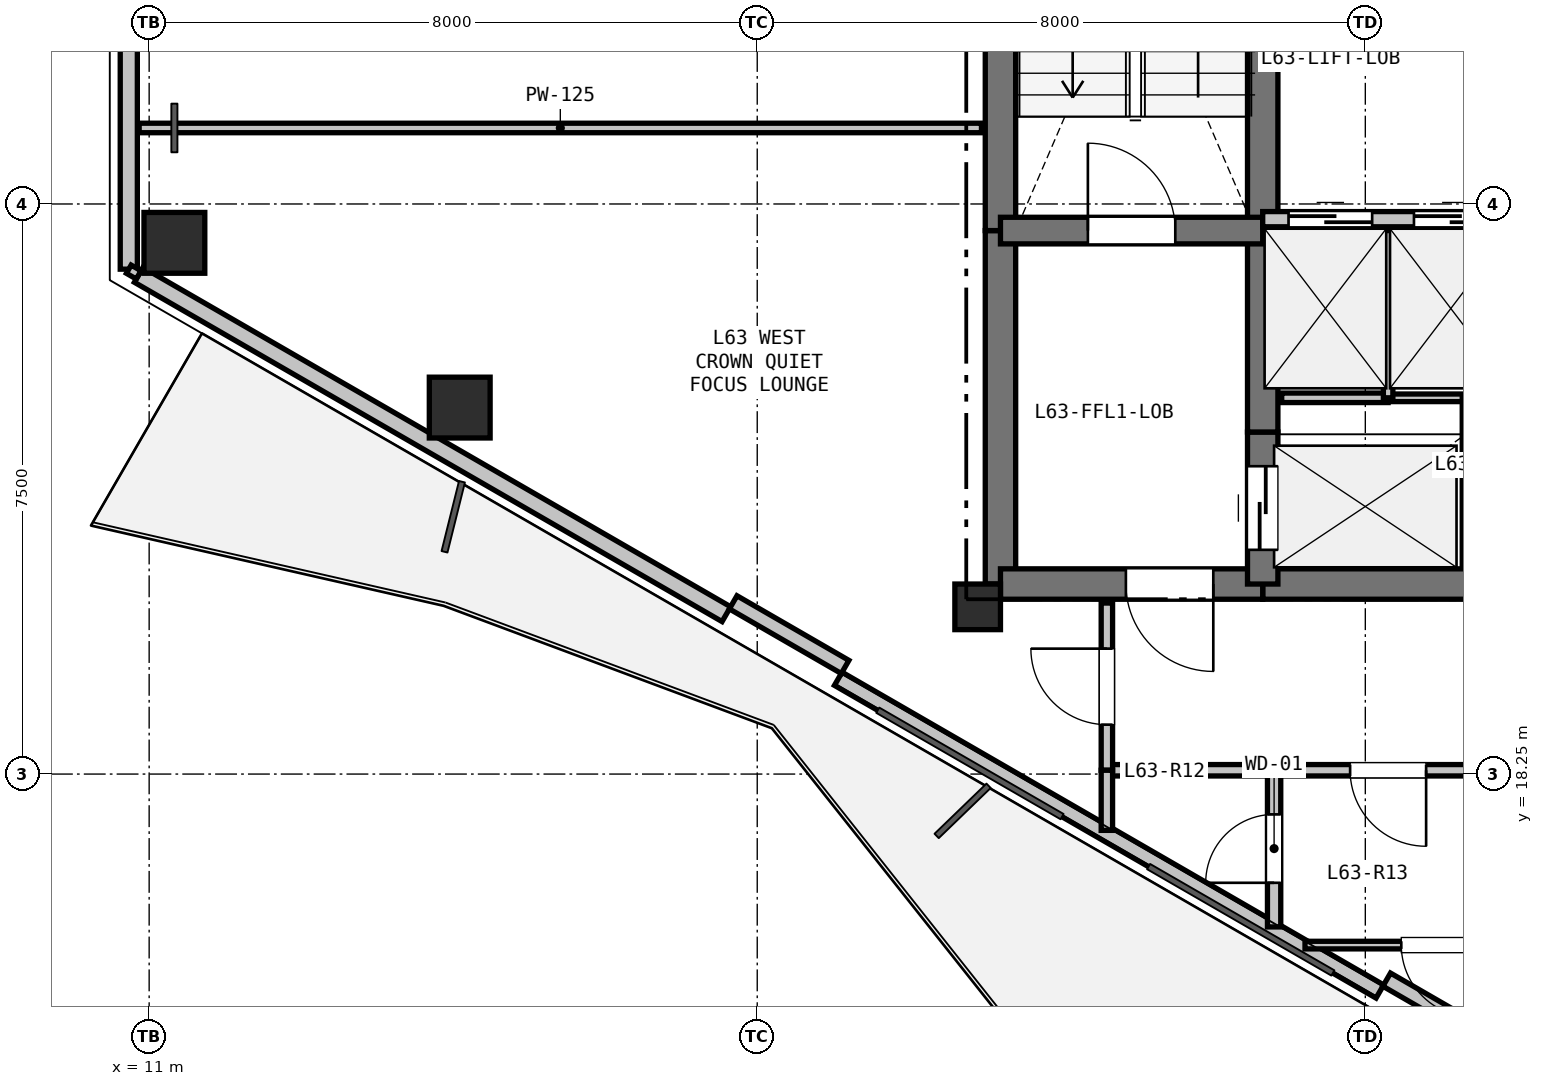
"""IFC4 building model, lengths in metres.
Left out: names, types, materials, properties, quantities, classifications, styles, units other than length and angle.
Written with IfcOpenShell. Run it as: python <this file> out.ifc"""

import sys

from ifc_helpers import new_model, si_unit, direction, frame, frame_2d, origin, origin_2d, place, context, subcontext, project, spatial, rectangle, hollow_rectangle, extrude, element, fill, save


model = new_model("IFC4")
c1 = context("Model", 3, precision=1e-05, world=origin(), true_north=direction((0.0, 1.0)))
c2 = subcontext(c1, "Body", "Model", "MODEL_VIEW")
j1 = project(units=[si_unit("LENGTHUNIT", "METRE"), si_unit("PLANEANGLEUNIT", "RADIAN")], contexts=[c1])
p1 = place(None, origin())
s1 = spatial("IfcSite", under=j1, at=p1, CompositionType="ELEMENT")
p2 = place(p1, origin())
s2 = spatial("IfcBuilding", under=s1, at=p2, CompositionType="ELEMENT")
p3 = place(p2, frame((0.0, 0.0, 226.5)))
s3 = spatial("IfcBuildingStorey", under=s2, at=p3, CompositionType="ELEMENT", Elevation=226.5)
p4 = place(p3, frame((21.9, 20.45, 0.0), z_axis=(0.0, 0.0, 1.0), x_axis=(1.0, 0.0, 0.0)))
e1 = element("IfcColumn", 1, at=p4, inside=s3, PredefinedType="COLUMN", context=c2, shape_type="SweptSolid", body=[
    extrude(rectangle(XDim=0.6, YDim=0.6, at=origin_2d()), origin(), (0.0, 0.0, 1.0), 3.3),
])
for number, where, z_axis, x_axis in (
    (2, (15.086, 23.072, 0.0), (0.0, 0.0, 1.0), (1.0, 0.0, 0.0)),
    (3, (11.332, 25.239, 0.0), (0.0, 0.0, 1.0), (1.0, 0.0, 0.0)),
):
    element("IfcColumn", number, at=place(p3, frame(where, z_axis=z_axis, x_axis=x_axis)), inside=s3, PredefinedType="COLUMN", context=c2, shape_type="SweptSolid", body=[
        extrude(hollow_rectangle(XDim=0.8, YDim=0.8, WallThickness=0.025, at=origin_2d()), origin(), (0.0, 0.0, 1.0), 3.3),
    ])
p5 = place(p3, frame((10.732, 24.892, 0.0), z_axis=(0.0, 0.0, 1.0), x_axis=(0.0, 1.0, 0.0)))
e4 = element("IfcWall", 4, at=p5, inside=s3, PredefinedType="SOLIDWALL", context=c2, shape_type="SweptSolid", body=[
    extrude(rectangle(XDim=3.715, YDim=0.225, at=frame_2d((1.858, 0.0))), origin(), (0.0, 0.0, 1.0), 2.7),
])
p6 = place(p3, frame((27.191, 15.389, 0.0), z_axis=(0.0, 0.0, 1.0), x_axis=(-0.866019557082, 0.500010126649, 0.0)))
e5 = element("IfcWall", 5, at=p6, inside=s3, PredefinedType="PARAPET", context=c2, shape_type="SweptSolid", body=[
    extrude(rectangle(XDim=8.228, YDim=0.2, at=frame_2d((4.114, 0.0))), origin(), (0.0, 0.0, 1.0), 0.2),
])
p7 = place(p3, frame((18.594, 20.354, 0.0), z_axis=(0.0, 0.0, 1.0), x_axis=(-0.866026655105, 0.499997832642, 0.0)))
e6 = element("IfcWall", 6, at=p7, inside=s3, PredefinedType="SOLIDWALL", context=c2, shape_type="SweptSolid", body=[
    extrude(rectangle(XDim=8.928, YDim=0.225, at=frame_2d((4.464, 0.0))), origin(), (0.0, 0.0, 1.0), 2.7),
])
for number, where, z_axis, x_axis in (
    (7, (28.754, 14.695, 0.0), (0.0, 0.0, 1.0), (-0.866, 0.5, 0.0)),
    (8, (20.156, 19.659, 0.0), (0.0, 0.0, 1.0), (-0.866, 0.5, 0.0)),
):
    element("IfcWall", number, at=place(p3, frame(where, z_axis=z_axis, x_axis=x_axis)), inside=s3, PredefinedType="PARAPET", context=c2, shape_type="SweptSolid", body=[
        extrude(rectangle(XDim=1.7, YDim=0.2, at=frame_2d((0.85, 0.0))), origin(), (0.0, 0.0, 1.0), 2.7),
    ])
p8 = place(p3, frame((22.2, 20.75, 0.0), z_axis=(0.0, 0.0, 1.0), x_axis=(0.0, 1.0, 0.0)))
e9 = element("IfcWall", 9, at=p8, inside=s3, PredefinedType="SHEAR", context=c2, shape_type="SweptSolid", body=[
    extrude(rectangle(XDim=4.65, YDim=0.4, at=frame_2d((2.325, 0.0))), origin(), (0.0, 0.0, 1.0), 3.08),
])
p9 = place(p3, frame((22.2, 25.4, 0.0), z_axis=(0.0, 0.0, 1.0), x_axis=(0.0, 1.0, 0.0)))
e10 = element("IfcWall", 10, at=p9, inside=s3, PredefinedType="SHEAR", context=c2, shape_type="SweptSolid", body=[
    extrude(rectangle(XDim=7.35, YDim=0.4, at=frame_2d((3.675, 0.0))), origin(), (0.0, 0.0, 1.0), 3.08),
])
p10 = place(p3, frame((28.35, 20.75, 0.0), z_axis=(0.0, 0.0, 1.0), x_axis=(-1.0, 0.0, 0.0)))
e11 = element("IfcWall", 11, at=p10, inside=s3, PredefinedType="SHEAR", context=c2, shape_type="SweptSolid", body=[
    extrude(rectangle(XDim=2.7, YDim=0.4, at=frame_2d((1.35, 0.0))), origin(), (0.0, 0.0, 1.0), 3.08),
])
p11 = place(p3, frame((25.65, 20.75, 0.0), z_axis=(0.0, 0.0, 1.0), x_axis=(-1.0, 0.0, 0.0)))
e12 = element("IfcWall", 12, at=p11, inside=s3, PredefinedType="SHEAR", context=c2, shape_type="SweptSolid", body=[
    extrude(rectangle(XDim=3.45, YDim=0.4, at=frame_2d((1.725, 0.0))), origin(), (0.0, 0.0, 1.0), 3.08),
])
p12 = place(p11, frame((0.65, 0.0, 0.0)))
e13 = element("IfcOpeningElement", 13, at=p12, cuts=e12, PredefinedType="OPENING", context=c2, shape_type="SweptSolid", body=[
    extrude(rectangle(XDim=1.15, YDim=2.15, at=frame_2d((0.575, 1.075))), frame((0.0, 0.21, 0.0), z_axis=(0.0, -1.0, 0.0), x_axis=(1.0, 0.0, 0.0)), (0.0, 0.0, 1.0), 0.42),
])
p13 = place(p3, frame((25.65, 20.75, 0.0), z_axis=(0.0, 0.0, 1.0), x_axis=(0.0, 1.0, 0.0)))
e14 = element("IfcWall", 14, at=p13, inside=s3, PredefinedType="SHEAR", context=c2, shape_type="SweptSolid", body=[
    extrude(rectangle(XDim=2.0, YDim=0.4, at=frame_2d((1.0, 0.0))), origin(), (0.0, 0.0, 1.0), 3.08),
])
p14 = place(p13, frame((0.45, 0.0, 0.0)))
e15 = element("IfcOpeningElement", 15, at=p14, cuts=e14, PredefinedType="OPENING", context=c2, shape_type="SweptSolid", body=[
    extrude(rectangle(XDim=1.1, YDim=2.15, at=frame_2d((0.55, 1.075))), frame((0.0, 0.21, 0.0), z_axis=(0.0, -1.0, 0.0), x_axis=(1.0, 0.0, 0.0)), (0.0, 0.0, 1.0), 0.42),
])
p15 = place(p3, frame((25.65, 22.75, 0.0), z_axis=(0.0, 0.0, 1.0), x_axis=(0.0, 1.0, 0.0)))
e16 = element("IfcWall", 16, at=p15, inside=s3, PredefinedType="SHEAR", context=c2, shape_type="SweptSolid", body=[
    extrude(rectangle(XDim=2.8, YDim=0.4, at=frame_2d((1.4, 0.0))), origin(), (0.0, 0.0, 1.0), 3.08),
])
p16 = place(p3, frame((25.65, 25.55, 0.0), z_axis=(0.0, 0.0, 1.0), x_axis=(0.0, 1.0, 0.0)))
e17 = element("IfcWall", 17, at=p16, inside=s3, PredefinedType="SHEAR", context=c2, shape_type="SweptSolid", body=[
    extrude(rectangle(XDim=2.4, YDim=0.4, at=frame_2d((1.2, 0.0))), origin(), (0.0, 0.0, 1.0), 3.08),
])
p17 = place(p3, frame((22.2, 25.4, 0.0), z_axis=(0.0, 0.0, 1.0), x_axis=(1.0, 0.0, 0.0)))
e18 = element("IfcWall", 18, at=p17, inside=s3, PredefinedType="SHEAR", context=c2, shape_type="SweptSolid", body=[
    extrude(rectangle(XDim=3.45, YDim=0.35, at=frame_2d((1.725, 0.0))), origin(), (0.0, 0.0, 1.0), 3.08),
])
p18 = place(p17, frame((1.15, 0.0, 0.0)))
e19 = element("IfcOpeningElement", 19, at=p18, cuts=e18, PredefinedType="OPENING", context=c2, shape_type="SweptSolid", body=[
    extrude(rectangle(XDim=1.15, YDim=2.15, at=frame_2d((0.575, 1.075))), frame((0.0, 0.185, 0.0), z_axis=(0.0, -1.0, 0.0), x_axis=(1.0, 0.0, 0.0)), (0.0, 0.0, 1.0), 0.37),
])
p19 = place(p3, frame((25.65, 25.55, 0.0), z_axis=(0.0, 0.0, 1.0), x_axis=(1.0, 0.0, 0.0)))
e20 = element("IfcWall", 20, at=p19, inside=s3, PredefinedType="PARTITIONING", context=c2, shape_type="SweptSolid", body=[
    extrude(rectangle(XDim=4.95, YDim=0.2, at=frame_2d((2.475, 0.0))), origin(), (0.0, 0.0, 1.0), 3.08),
])
p20 = place(p19, frame((0.34, 0.0, 0.0)))
e21 = element("IfcOpeningElement", 21, at=p20, cuts=e20, PredefinedType="OPENING", context=c2, shape_type="SweptSolid", body=[
    extrude(rectangle(XDim=1.1, YDim=2.15, at=frame_2d((0.55, 1.075))), frame((0.0, 0.11, 0.0), z_axis=(0.0, -1.0, 0.0), x_axis=(1.0, 0.0, 0.0)), (0.0, 0.0, 1.0), 0.22),
])
p21 = place(p19, frame((1.99, 0.0, 0.0)))
e22 = element("IfcOpeningElement", 22, at=p21, cuts=e20, PredefinedType="OPENING", context=c2, shape_type="SweptSolid", body=[
    extrude(rectangle(XDim=1.1, YDim=2.15, at=frame_2d((0.55, 1.075))), frame((0.0, 0.11, 0.0), z_axis=(0.0, -1.0, 0.0), x_axis=(1.0, 0.0, 0.0)), (0.0, 0.0, 1.0), 0.22),
])
p22 = place(p19, frame((3.64, 0.0, 0.0)))
e23 = element("IfcOpeningElement", 23, at=p22, cuts=e20, PredefinedType="OPENING", context=c2, shape_type="SweptSolid", body=[
    extrude(rectangle(XDim=1.1, YDim=2.15, at=frame_2d((0.55, 1.075))), frame((0.0, 0.11, 0.0), z_axis=(0.0, -1.0, 0.0), x_axis=(1.0, 0.0, 0.0)), (0.0, 0.0, 1.0), 0.22),
])
p23 = place(p3, frame((25.9, 23.2, 0.0), z_axis=(0.0, 0.0, 1.0), x_axis=(1.0, 0.0, 0.0)))
e24 = element("IfcWall", 24, at=p23, inside=s3, PredefinedType="PARTITIONING", context=c2, shape_type="SweptSolid", body=[
    extrude(rectangle(XDim=1.4, YDim=0.125, at=frame_2d((0.7, 0.0))), origin(), (0.0, 0.0, 1.0), 3.08),
])
p24 = place(p3, frame((27.3, 23.2, 0.0), z_axis=(0.0, 0.0, 1.0), x_axis=(1.0, 0.0, 0.0)))
e25 = element("IfcWall", 25, at=p24, inside=s3, PredefinedType="PARTITIONING", context=c2, shape_type="SweptSolid", body=[
    extrude(rectangle(XDim=1.05, YDim=0.1, at=frame_2d((0.525, 0.0))), origin(), (0.0, 0.0, 1.0), 3.08),
])
p25 = place(p3, frame((28.35, 23.2, 0.0), z_axis=(0.0, 0.0, 1.0), x_axis=(0.0, -1.0, 0.0)))
e26 = element("IfcWall", 26, at=p25, inside=s3, PredefinedType="PARTITIONING", context=c2, shape_type="SweptSolid", body=[
    extrude(rectangle(XDim=2.2, YDim=0.15, at=frame_2d((1.1, 0.0))), origin(), (0.0, 0.0, 1.0), 3.08),
])
p26 = place(p3, frame((27.3, 25.4, 0.0), z_axis=(0.0, 0.0, 1.0), x_axis=(0.0, -1.0, 0.0)))
e27 = element("IfcWall", 27, at=p26, inside=s3, PredefinedType="PARTITIONING", context=c2, shape_type="SweptSolid", body=[
    extrude(rectangle(XDim=2.2, YDim=0.125, at=frame_2d((1.1, 0.0))), origin(), (0.0, 0.0, 1.0), 3.08),
])
p27 = place(p3, frame((28.8, 18.3, 0.0), z_axis=(0.0, 0.0, 1.0), x_axis=(-1.0, 0.0, 0.0)))
e28 = element("IfcWall", 28, at=p27, inside=s3, PredefinedType="PARTITIONING", context=c2, shape_type="SweptSolid", body=[
    extrude(rectangle(XDim=3.0, YDim=0.15, at=frame_2d((1.5, 0.0))), origin(), (0.0, 0.0, 1.0), 3.08),
])
p28 = place(p27, frame((1.0, 0.0, 0.0)))
e29 = element("IfcOpeningElement", 29, at=p28, cuts=e28, PredefinedType="OPENING", context=c2, shape_type="SweptSolid", body=[
    extrude(rectangle(XDim=1.0, YDim=2.15, at=frame_2d((0.5, 1.075))), frame((0.0, 0.085, 0.0), z_axis=(0.0, -1.0, 0.0), x_axis=(1.0, 0.0, 0.0)), (0.0, 0.0, 1.0), 0.17),
])
p29 = place(p3, frame((25.8, 18.3, 0.0), z_axis=(0.0, 0.0, 1.0), x_axis=(-1.0, 0.0, 0.0)))
e30 = element("IfcWall", 30, at=p29, inside=s3, PredefinedType="PARTITIONING", context=c2, shape_type="SweptSolid", body=[
    extrude(rectangle(XDim=2.2, YDim=0.15, at=frame_2d((1.1, 0.0))), origin(), (0.0, 0.0, 1.0), 2.365),
])
p30 = place(p3, frame((23.6, 18.3, 0.0), z_axis=(0.0, 0.0, 1.0), x_axis=(0.0, 1.0, 0.0)))
e31 = element("IfcWall", 31, at=p30, inside=s3, PredefinedType="PARTITIONING", context=c2, shape_type="SweptSolid", body=[
    extrude(rectangle(XDim=2.2, YDim=0.15, at=frame_2d((1.1, 0.0))), origin(), (0.0, 0.0, 1.0), 2.528),
])
p31 = place(p30, frame((0.6, 0.0, 0.0)))
e32 = element("IfcOpeningElement", 32, at=p31, cuts=e31, PredefinedType="OPENING", context=c2, shape_type="SweptSolid", body=[
    extrude(rectangle(XDim=1.0, YDim=2.15, at=frame_2d((0.5, 1.075))), frame((0.0, 0.085, 0.0), z_axis=(0.0, -1.0, 0.0), x_axis=(1.0, 0.0, 0.0)), (0.0, 0.0, 1.0), 0.17),
])
p32 = place(p3, frame((28.8, 16.0, 0.0), z_axis=(0.0, 0.0, 1.0), x_axis=(-1.0, 0.0, 0.0)))
e33 = element("IfcWall", 33, at=p32, inside=s3, PredefinedType="PARTITIONING", context=c2, shape_type="SweptSolid", body=[
    extrude(rectangle(XDim=2.594, YDim=0.1, at=frame_2d((1.297, 0.0))), origin(), (0.0, 0.0, 1.0), 2.365),
])
p33 = place(p32, frame((0.377, 0.0, 0.0)))
e34 = element("IfcOpeningElement", 34, at=p33, cuts=e33, PredefinedType="OPENING", context=c2, shape_type="SweptSolid", body=[
    extrude(rectangle(XDim=0.95, YDim=2.1, at=frame_2d((0.475, 1.05))), frame((0.0, 0.06, 0.0), z_axis=(0.0, -1.0, 0.0), x_axis=(1.0, 0.0, 0.0)), (0.0, 0.0, 1.0), 0.12),
])
p34 = place(p3, frame((25.8, 16.239, 0.0), z_axis=(0.0, 0.0, 1.0), x_axis=(0.0, 1.0, 0.0)))
e35 = element("IfcWall", 35, at=p34, inside=s3, PredefinedType="PLUMBINGWALL", context=c2, shape_type="SweptSolid", body=[
    extrude(rectangle(XDim=2.061, YDim=0.175, at=frame_2d((1.031, 0.0))), origin(), (0.0, 0.0, 1.0), 2.365),
])
p35 = place(p34, frame((0.581, 0.0, 0.0)))
e36 = element("IfcOpeningElement", 36, at=p35, cuts=e35, PredefinedType="OPENING", context=c2, shape_type="SweptSolid", body=[
    extrude(rectangle(XDim=0.9, YDim=2.1, at=frame_2d((0.45, 1.05))), frame((0.0, 0.097, 0.0), z_axis=(0.0, -1.0, 0.0), x_axis=(1.0, 0.0, 0.0)), (0.0, 0.0, 1.0), 0.195),
])
p36 = place(p3, frame((23.6, 17.509, 0.0), z_axis=(0.0, 0.0, 1.0), x_axis=(0.0, 1.0, 0.0)))
e37 = element("IfcWall", 37, at=p36, inside=s3, PredefinedType="PARTITIONING", context=c2, shape_type="SweptSolid", body=[
    extrude(rectangle(XDim=0.791, YDim=0.15, at=frame_2d((0.396, 0.0))), origin(), (0.0, 0.0, 1.0), 2.365),
])
p37 = place(p3, frame((21.95, 26.75, 0.0), z_axis=(0.0, 0.0, 1.0), x_axis=(-1.0, 0.0, 0.0)))
e38 = element("IfcWall", 38, at=p37, inside=s3, PredefinedType="PARTITIONING", context=c2, shape_type="SweptSolid", body=[
    extrude(rectangle(XDim=11.082, YDim=0.125, at=frame_2d((5.541, 0.0))), origin(), (0.0, 0.0, 1.0), 2.605),
])
p38 = place(p3, frame((10.862, 24.817, 0.0), z_axis=(0.0, 0.0, 1.0), x_axis=(-0.866131372301, 0.499816412211, 0.0)))
e39 = element("IfcWall", 39, at=p38, inside=s3, PredefinedType="PARTITIONING", context=c2, shape_type="SweptSolid", body=[
    extrude(rectangle(XDim=0.15, YDim=0.125, at=frame_2d((0.075, 0.0))), origin(), (0.0, 0.0, 1.0), 3.08),
])
p39 = place(p20, origin())
e40 = element("IfcDoor", 40, at=p39, inside=s3, OperationType="SLIDING_TO_LEFT", PredefinedType="DOOR", context=c2, shape_type="SweptSolid", body=[
    extrude(rectangle(XDim=1.1, YDim=2.15, at=frame_2d((0.55, 1.075))), frame((0.0, 0.025, 0.0), z_axis=(0.0, -1.0, 0.0), x_axis=(1.0, 0.0, 0.0)), (0.0, 0.0, 1.0), 0.05),
])
fill(e21, e40)
p40 = place(p21, origin())
e41 = element("IfcDoor", 41, at=p40, inside=s3, OperationType="SLIDING_TO_LEFT", PredefinedType="DOOR", context=c2, shape_type="SweptSolid", body=[
    extrude(rectangle(XDim=1.1, YDim=2.15, at=frame_2d((0.55, 1.075))), frame((0.0, 0.025, 0.0), z_axis=(0.0, -1.0, 0.0), x_axis=(1.0, 0.0, 0.0)), (0.0, 0.0, 1.0), 0.05),
])
fill(e22, e41)
p41 = place(p14, origin())
e42 = element("IfcDoor", 42, at=p41, inside=s3, OperationType="SLIDING_TO_LEFT", PredefinedType="DOOR", context=c2, shape_type="SweptSolid", body=[
    extrude(rectangle(XDim=1.1, YDim=2.15, at=frame_2d((0.55, 1.075))), frame((0.0, 0.025, 0.0), z_axis=(0.0, -1.0, 0.0), x_axis=(1.0, 0.0, 0.0)), (0.0, 0.0, 1.0), 0.05),
])
fill(e15, e42)
p42 = place(p18, origin())
e43 = element("IfcDoor", 43, at=p42, inside=s3, OperationType="SINGLE_SWING_LEFT", PredefinedType="DOOR", context=c2, shape_type="SweptSolid", body=[
    extrude(rectangle(XDim=1.15, YDim=2.15, at=frame_2d((0.575, 1.075))), frame((0.0, 0.025, 0.0), z_axis=(0.0, -1.0, 0.0), x_axis=(1.0, 0.0, 0.0)), (0.0, 0.0, 1.0), 0.05),
])
fill(e19, e43)
p43 = place(p12, origin())
e44 = element("IfcDoor", 44, at=p43, inside=s3, OperationType="SINGLE_SWING_LEFT", PredefinedType="DOOR", context=c2, shape_type="SweptSolid", body=[
    extrude(rectangle(XDim=1.15, YDim=2.15, at=frame_2d((0.575, 1.075))), frame((0.0, 0.025, 0.0), z_axis=(0.0, -1.0, 0.0), x_axis=(1.0, 0.0, 0.0)), (0.0, 0.0, 1.0), 0.05),
])
fill(e13, e44)
p44 = place(p28, origin())
e45 = element("IfcDoor", 45, at=p44, inside=s3, OperationType="SINGLE_SWING_LEFT", PredefinedType="DOOR", context=c2, shape_type="SweptSolid", body=[
    extrude(rectangle(XDim=1.0, YDim=2.15, at=frame_2d((0.5, 1.075))), frame((0.0, 0.025, 0.0), z_axis=(0.0, -1.0, 0.0), x_axis=(1.0, 0.0, 0.0)), (0.0, 0.0, 1.0), 0.05),
])
fill(e29, e45)
p45 = place(p31, origin())
e46 = element("IfcDoor", 46, at=p45, inside=s3, OperationType="SINGLE_SWING_RIGHT", PredefinedType="DOOR", context=c2, shape_type="SweptSolid", body=[
    extrude(rectangle(XDim=1.0, YDim=2.15, at=frame_2d((0.5, 1.075))), frame((0.0, 0.025, 0.0), z_axis=(0.0, -1.0, 0.0), x_axis=(1.0, 0.0, 0.0)), (0.0, 0.0, 1.0), 0.05),
])
fill(e32, e46)
p46 = place(p35, origin())
e47 = element("IfcDoor", 47, at=p46, inside=s3, OperationType="SINGLE_SWING_LEFT", PredefinedType="DOOR", context=c2, shape_type="SweptSolid", body=[
    extrude(rectangle(XDim=0.9, YDim=2.1, at=frame_2d((0.45, 1.05))), frame((0.0, 0.025, 0.0), z_axis=(0.0, -1.0, 0.0), x_axis=(1.0, 0.0, 0.0)), (0.0, 0.0, 1.0), 0.05),
])
fill(e36, e47)
p47 = place(p33, origin())
e48 = element("IfcDoor", 48, at=p47, inside=s3, OperationType="SINGLE_SWING_LEFT", PredefinedType="DOOR", context=c2, shape_type="SweptSolid", body=[
    extrude(rectangle(XDim=0.95, YDim=2.1, at=frame_2d((0.475, 1.05))), frame((0.0, 0.025, 0.0), z_axis=(0.0, -1.0, 0.0), x_axis=(1.0, 0.0, 0.0)), (0.0, 0.0, 1.0), 0.05),
])
fill(e34, e48)
save(model, sys.argv[1])
